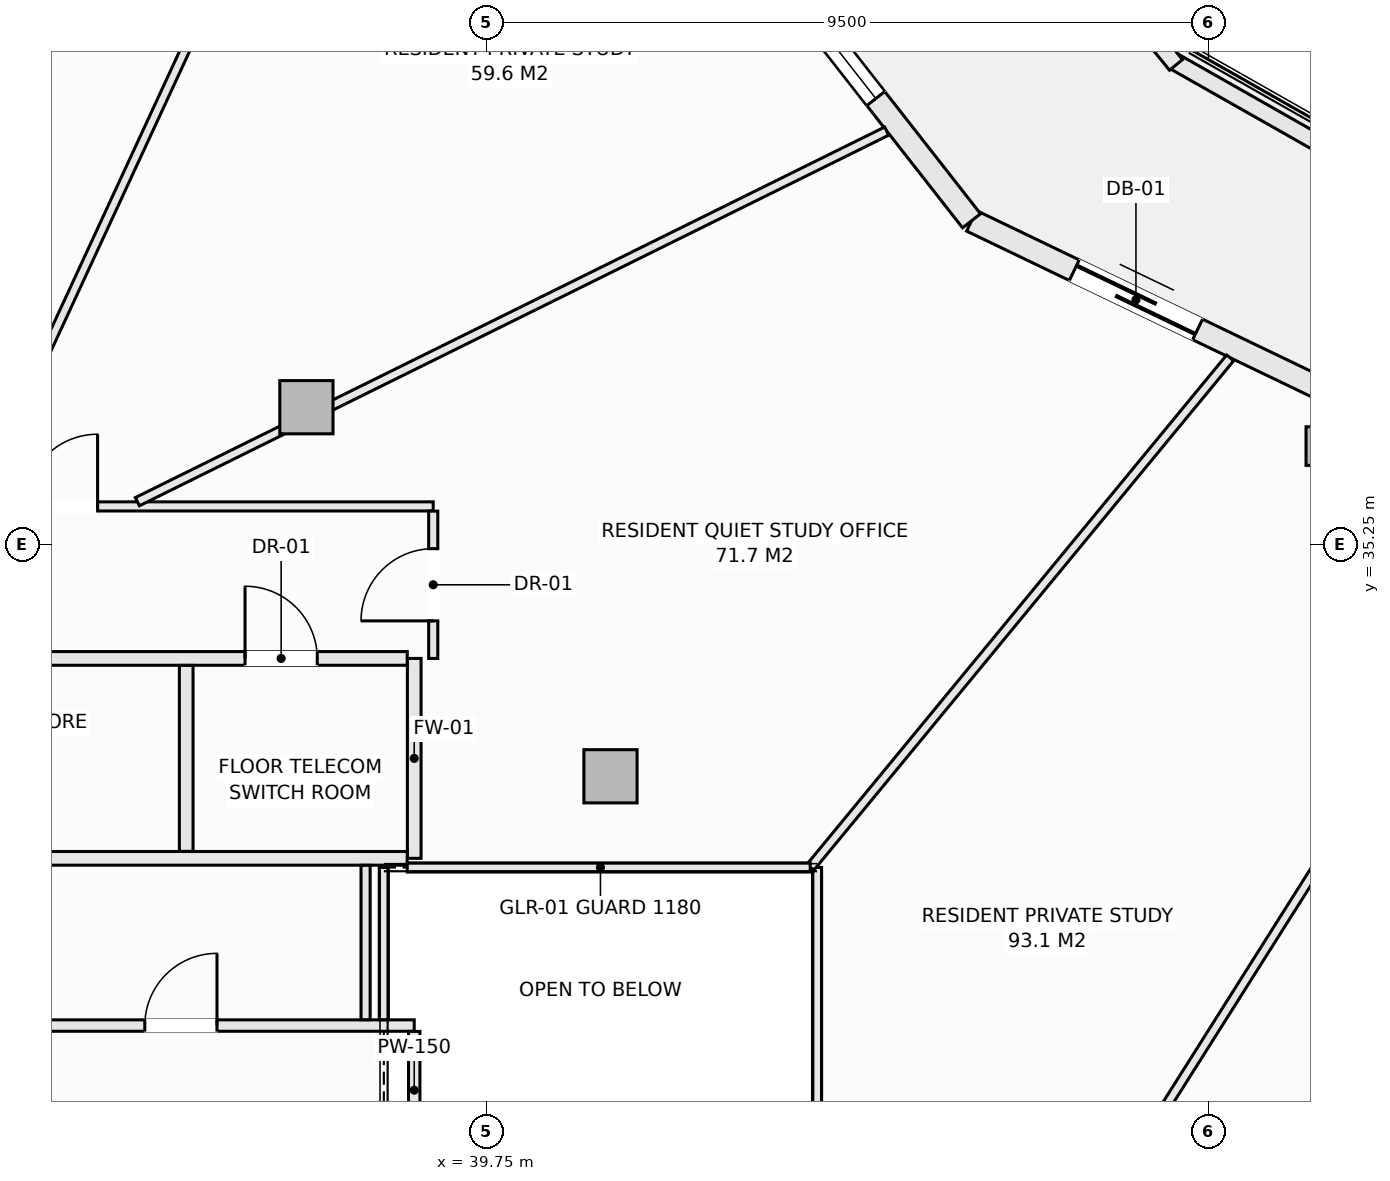
"""IFC4 building model, lengths in metres.
Left out: names, types, materials, properties, quantities, classifications, styles, units other than length and angle.
Written with IfcOpenShell. Run it as: python <this file> out.ifc"""

import sys

from ifc_helpers import new_model, si_unit, direction, frame, frame_2d, origin, origin_2d, place, context, subcontext, project, spatial, rectangle, hollow_rectangle, extrude, element, fill, save


model = new_model("IFC4")
c1 = context("Model", 3, precision=1e-05, world=origin(), true_north=direction((0.0, 1.0)))
c2 = subcontext(c1, "Body", "Model", "MODEL_VIEW")
j1 = project(units=[si_unit("LENGTHUNIT", "METRE"), si_unit("PLANEANGLEUNIT", "RADIAN")], contexts=[c1])
p1 = place(None, origin())
s1 = spatial("IfcSite", under=j1, at=p1, CompositionType="ELEMENT")
p2 = place(p1, origin())
s2 = spatial("IfcBuilding", under=s1, at=p2, CompositionType="ELEMENT")
p3 = place(p2, frame((0.0, 0.0, 206.3)))
s3 = spatial("IfcBuildingStorey", under=s2, at=p3, CompositionType="ELEMENT", Elevation=206.3)
p4 = place(p3, frame((50.787, 36.544, -0.27), z_axis=(0.0, 0.0, 1.0), x_axis=(1.0, 0.0, 0.0)))
e1 = element("IfcColumn", 1, at=p4, inside=s3, PredefinedType="COLUMN", context=c2, shape_type="SweptSolid", body=[
    extrude(hollow_rectangle(XDim=0.508, YDim=0.508, WallThickness=0.019, at=origin_2d()), origin(), (0.0, 0.0, 1.0), 3.3),
])
for number, where, z_axis, x_axis in (
    (2, (41.382, 32.199, -0.27), (0.0, 0.0, 1.0), (1.0, 0.0, 0.0)),
    (3, (37.382, 37.055, -0.27), (0.0, 0.0, 1.0), (1.0, 0.0, 0.0)),
):
    element("IfcColumn", number, at=place(p3, frame(where, z_axis=z_axis, x_axis=x_axis)), inside=s3, PredefinedType="COLUMN", context=c2, shape_type="SweptSolid", body=[
        extrude(rectangle(XDim=0.7, YDim=0.7, at=origin_2d()), origin(), (0.0, 0.0, 1.0), 3.3),
    ])
p5 = place(p3, frame((46.133, 39.507, 0.0), z_axis=(0.0, 0.0, 1.0), x_axis=(0.901348331142, -0.433094892545, 0.0)))
e4 = element("IfcWall", 4, at=p5, inside=s3, PredefinedType="SOLIDWALL", context=c2, shape_type="SweptSolid", body=[
    extrude(rectangle(XDim=6.021, YDim=0.3, at=frame_2d((3.01, 0.0))), origin(), (0.0, 0.0, 1.0), 2.605),
])
p6 = place(p5, frame((1.5, 0.0, 0.0)))
e5 = element("IfcOpeningElement", 5, at=p6, cuts=e4, PredefinedType="OPENING", context=c2, shape_type="SweptSolid", body=[
    extrude(rectangle(XDim=1.8, YDim=2.25, at=frame_2d((0.9, 1.125))), frame((0.0, 0.16, 0.0), z_axis=(0.0, -1.0, 0.0), x_axis=(1.0, 0.0, 0.0)), (0.0, 0.0, 1.0), 0.32),
])
p7 = place(p3, frame((42.5, 44.147, 0.0), z_axis=(0.0, 0.0, 1.0), x_axis=(0.616450126935, -0.787393955401, 0.0)))
e6 = element("IfcWall", 6, at=p7, inside=s3, PredefinedType="SOLIDWALL", context=c2, shape_type="SweptSolid", body=[
    extrude(rectangle(XDim=5.893, YDim=0.3, at=frame_2d((2.946, 0.0))), origin(), (0.0, 0.0, 1.0), 2.605),
])
p8 = place(p7, frame((1.65, 0.0, 0.72)))
e7 = element("IfcOpeningElement", 7, at=p8, cuts=e6, PredefinedType="OPENING", context=c2, shape_type="SweptSolid", body=[
    extrude(rectangle(XDim=2.2, YDim=1.65, at=frame_2d((1.1, 0.825))), frame((0.0, 0.16, 0.0), z_axis=(0.0, -1.0, 0.0), x_axis=(1.0, 0.0, 0.0)), (0.0, 0.0, 1.0), 0.32),
])
p9 = place(p3, frame((48.776, 41.617, 0.0), z_axis=(0.0, 0.0, 1.0), x_axis=(0.869860619267, -0.493297580623, 0.0)))
e8 = element("IfcWall", 8, at=p9, inside=s3, PredefinedType="PARAPET", context=c2, shape_type="SweptSolid", body=[
    extrude(rectangle(XDim=6.743, YDim=0.22, at=frame_2d((3.371, 0.0))), origin(), (0.0, 0.0, 1.0), 0.52),
])
p10 = place(p3, frame((44.448, 46.913, 0.0), z_axis=(0.0, 0.0, 1.0), x_axis=(0.632697312147, -0.774399193699, 0.0)))
e9 = element("IfcWall", 9, at=p10, inside=s3, PredefinedType="PARAPET", context=c2, shape_type="SweptSolid", body=[
    extrude(rectangle(XDim=6.914, YDim=0.22, at=frame_2d((3.457, 0.0))), origin(), (0.0, 0.0, 1.0), 0.52),
])
p11 = place(p3, frame((30.077, 28.92, 0.0), z_axis=(0.0, 0.0, 1.0), x_axis=(1.0, 0.0, 0.0)))
e10 = element("IfcWall", 10, at=p11, inside=s3, PredefinedType="PARTITIONING", context=c2, shape_type="SweptSolid", body=[
    extrude(rectangle(XDim=8.723, YDim=0.15, at=frame_2d((4.362, 0.0))), origin(), (0.0, 0.0, 1.0), 3.03),
])
p12 = place(p11, frame((1.342, 0.0, 0.0)))
e11 = element("IfcOpeningElement", 11, at=p12, cuts=e10, PredefinedType="OPENING", context=c2, shape_type="SweptSolid", body=[
    extrude(rectangle(XDim=0.95, YDim=2.1, at=frame_2d((0.475, 1.05))), frame((0.0, 0.085, 0.0), z_axis=(0.0, -1.0, 0.0), x_axis=(1.0, 0.0, 0.0)), (0.0, 0.0, 1.0), 0.17),
])
p13 = place(p11, frame((5.178, 0.0, 0.0)))
e12 = element("IfcOpeningElement", 12, at=p13, cuts=e10, PredefinedType="OPENING", context=c2, shape_type="SweptSolid", body=[
    extrude(rectangle(XDim=0.95, YDim=2.1, at=frame_2d((0.475, 1.05))), frame((0.0, 0.085, 0.0), z_axis=(0.0, -1.0, 0.0), x_axis=(1.0, 0.0, 0.0)), (0.0, 0.0, 1.0), 0.17),
])
p14 = place(p3, frame((38.8, 27.297, 0.0), z_axis=(0.0, 0.0, 1.0), x_axis=(0.0, 1.0, 0.0)))
e13 = element("IfcWall", 13, at=p14, inside=s3, PredefinedType="PARTITIONING", context=c2, shape_type="SweptSolid", body=[
    extrude(rectangle(XDim=1.546, YDim=0.15, at=frame_2d((0.773, 0.0))), origin(), (0.0, 0.0, 1.0), 3.03),
])
p15 = place(p3, frame((38.8, 31.12, 0.0), z_axis=(0.0, 0.0, 1.0), x_axis=(0.0, 1.0, 0.0)))
e14 = element("IfcWall", 14, at=p15, inside=s3, PredefinedType="SOLIDWALL", context=c2, shape_type="SweptSolid", body=[
    extrude(rectangle(XDim=2.63, YDim=0.18, at=frame_2d((1.315, 0.0))), origin(), (0.0, 0.0, 1.0), 3.03),
])
p16 = place(p3, frame((30.077, 31.12, 0.0), z_axis=(0.0, 0.0, 1.0), x_axis=(1.0, 0.0, 0.0)))
e15 = element("IfcWall", 15, at=p16, inside=s3, PredefinedType="SOLIDWALL", context=c2, shape_type="SweptSolid", body=[
    extrude(rectangle(XDim=8.631, YDim=0.18, at=frame_2d((4.315, 0.0))), origin(), (0.0, 0.0, 1.0), 3.03),
])
p17 = place(p16, frame((2.592, 0.0, 0.0)))
e16 = element("IfcOpeningElement", 16, at=p17, cuts=e15, PredefinedType="OPENING", context=c2, shape_type="SweptSolid", body=[
    extrude(rectangle(XDim=0.95, YDim=2.1, at=frame_2d((0.475, 1.05))), frame((0.0, 0.1, 0.0), z_axis=(0.0, -1.0, 0.0), x_axis=(1.0, 0.0, 0.0)), (0.0, 0.0, 1.0), 0.2),
])
p18 = place(p3, frame((30.077, 33.75, 0.0), z_axis=(0.0, 0.0, 1.0), x_axis=(1.0, 0.0, 0.0)))
e17 = element("IfcWall", 17, at=p18, inside=s3, PredefinedType="SOLIDWALL", context=c2, shape_type="SweptSolid", body=[
    extrude(rectangle(XDim=8.631, YDim=0.18, at=frame_2d((4.315, 0.0))), origin(), (0.0, 0.0, 1.0), 3.03),
])
p19 = place(p18, frame((6.497, 0.0, 0.0)))
e18 = element("IfcOpeningElement", 18, at=p19, cuts=e17, PredefinedType="OPENING", context=c2, shape_type="SweptSolid", body=[
    extrude(rectangle(XDim=0.95, YDim=2.1, at=frame_2d((0.475, 1.05))), frame((0.0, 0.1, 0.0), z_axis=(0.0, -1.0, 0.0), x_axis=(1.0, 0.0, 0.0)), (0.0, 0.0, 1.0), 0.2),
])
p20 = place(p3, frame((35.8, 31.212, 0.0), z_axis=(0.0, 0.0, 1.0), x_axis=(0.0, 1.0, 0.0)))
e19 = element("IfcWall", 19, at=p20, inside=s3, PredefinedType="SOLIDWALL", context=c2, shape_type="SweptSolid", body=[
    extrude(rectangle(XDim=2.446, YDim=0.18, at=frame_2d((1.223, 0.0))), origin(), (0.0, 0.0, 1.0), 3.03),
])
p21 = place(p3, frame((30.062, 35.75, 0.0), z_axis=(0.0, 0.0, 1.0), x_axis=(1.0, 0.0, 0.0)))
e20 = element("IfcWall", 20, at=p21, inside=s3, PredefinedType="PARTITIONING", context=c2, shape_type="SweptSolid", body=[
    extrude(rectangle(XDim=8.988, YDim=0.12, at=frame_2d((4.494, 0.0))), origin(), (0.0, 0.0, 1.0), 2.478),
])
p22 = place(p21, frame((3.622, 0.0, 0.0)))
e21 = element("IfcOpeningElement", 21, at=p22, cuts=e20, PredefinedType="OPENING", context=c2, shape_type="SweptSolid", body=[
    extrude(rectangle(XDim=0.95, YDim=2.1, at=frame_2d((0.475, 1.05))), frame((0.0, 0.07, 0.0), z_axis=(0.0, -1.0, 0.0), x_axis=(1.0, 0.0, 0.0)), (0.0, 0.0, 1.0), 0.14),
])
p23 = place(p21, frame((1.216, 0.0, 0.0)))
e22 = element("IfcOpeningElement", 22, at=p23, cuts=e20, PredefinedType="OPENING", context=c2, shape_type="SweptSolid", body=[
    extrude(rectangle(XDim=0.95, YDim=2.1, at=frame_2d((0.475, 1.05))), frame((0.0, 0.07, 0.0), z_axis=(0.0, -1.0, 0.0), x_axis=(1.0, 0.0, 0.0)), (0.0, 0.0, 1.0), 0.14),
])
p24 = place(p3, frame((39.05, 33.75, 0.0), z_axis=(0.0, 0.0, 1.0), x_axis=(0.0, 1.0, 0.0)))
e23 = element("IfcWall", 23, at=p24, inside=s3, PredefinedType="PARTITIONING", context=c2, shape_type="SweptSolid", body=[
    extrude(rectangle(XDim=1.938, YDim=0.12, at=frame_2d((0.969, 0.0))), origin(), (0.0, 0.0, 1.0), 3.03),
])
p25 = place(p24, frame((0.494, 0.0, 0.0)))
e24 = element("IfcOpeningElement", 24, at=p25, cuts=e23, PredefinedType="OPENING", context=c2, shape_type="SweptSolid", body=[
    extrude(rectangle(XDim=0.95, YDim=2.1, at=frame_2d((0.475, 1.05))), frame((0.0, 0.07, 0.0), z_axis=(0.0, -1.0, 0.0), x_axis=(1.0, 0.0, 0.0)), (0.0, 0.0, 1.0), 0.14),
])
p26 = place(p3, frame((38.16, 28.997, 0.0), z_axis=(0.0, 0.0, 1.0), x_axis=(0.0, 1.0, 0.0)))
e25 = element("IfcWall", 25, at=p26, inside=s3, PredefinedType="PARTITIONING", context=c2, shape_type="SweptSolid", body=[
    extrude(rectangle(XDim=2.031, YDim=0.12, at=frame_2d((1.016, 0.0))), origin(), (0.0, 0.0, 1.0), 3.03),
])
p27 = place(p3, frame((41.582, 16.617, 0.0), z_axis=(0.0, 0.0, 1.0), x_axis=(0.534374121444, 0.845248069108, 0.0)))
e26 = element("IfcWall", 26, at=p27, inside=s3, PredefinedType="PARTITIONING", context=c2, shape_type="SweptSolid", body=[
    extrude(rectangle(XDim=20.892, YDim=0.12, at=frame_2d((10.446, 0.0))), origin(), (0.0, 0.0, 1.0), 3.03),
])
p28 = place(p3, frame((44.1, 27.812, 0.0), z_axis=(0.0, 0.0, 1.0), x_axis=(0.0, 1.0, 0.0)))
e27 = element("IfcWall", 27, at=p28, inside=s3, PredefinedType="PARTITIONING", context=c2, shape_type="SweptSolid", body=[
    extrude(rectangle(XDim=3.188, YDim=0.12, at=frame_2d((1.594, 0.0))), origin(), (0.0, 0.0, 1.0), 3.03),
])
p29 = place(p3, frame((44.01, 31.0, 0.0), z_axis=(0.0, 0.0, 1.0), x_axis=(0.635986973411, 0.771699792439, 0.0)))
e28 = element("IfcWall", 28, at=p29, inside=s3, PredefinedType="PARTITIONING", context=c2, shape_type="SweptSolid", body=[
    extrude(rectangle(XDim=8.687, YDim=0.12, at=frame_2d((4.344, 0.0))), origin(), (0.0, 0.0, 1.0), 2.712),
])
p30 = place(p3, frame((38.708, 31.0, 0.0), z_axis=(0.0, 0.0, 1.0), x_axis=(1.0, 0.0, 0.0)))
e29 = element("IfcWall", 29, at=p30, inside=s3, PredefinedType="PARTITIONING", context=c2, shape_type="SweptSolid", body=[
    extrude(rectangle(XDim=5.302, YDim=0.12, at=frame_2d((2.651, 0.0))), origin(), (0.0, 0.0, 1.0), 3.03),
])
p31 = place(p3, frame((38.4, 28.997, 0.0), z_axis=(0.0, 0.0, 1.0), x_axis=(0.0, 1.0, 0.0)))
e30 = element("IfcWall", 30, at=p31, inside=s3, PredefinedType="PARTITIONING", context=c2, shape_type="SweptSolid", body=[
    extrude(rectangle(XDim=2.003, YDim=0.12, at=frame_2d((1.001, 0.0))), origin(), (0.0, 0.0, 1.0), 3.03),
])
p32 = place(p3, frame((35.157, 35.812, 0.0), z_axis=(0.0, 0.0, 1.0), x_axis=(0.896376577458, 0.443293391992, 0.0)))
e31 = element("IfcWall", 31, at=p32, inside=s3, PredefinedType="PARTITIONING", context=c2, shape_type="SweptSolid", body=[
    extrude(rectangle(XDim=10.998, YDim=0.12, at=frame_2d((5.499, 0.0))), origin(), (0.0, 0.0, 1.0), 2.478),
])
p33 = place(p3, frame((33.038, 35.812, 0.0), z_axis=(0.0, 0.0, 1.0), x_axis=(0.419785881818, 0.907623167083, 0.0)))
e32 = element("IfcWall", 32, at=p33, inside=s3, PredefinedType="PARTITIONING", context=c2, shape_type="SweptSolid", body=[
    extrude(rectangle(XDim=10.806, YDim=0.12, at=frame_2d((5.403, 0.0))), origin(), (0.0, 0.0, 1.0), 3.03),
])
p34 = place(p6, origin())
e33 = element("IfcDoor", 33, at=p34, inside=s3, OperationType="SLIDING_TO_LEFT", PredefinedType="DOOR", context=c2, shape_type="SweptSolid", body=[
    extrude(rectangle(XDim=1.8, YDim=2.25, at=frame_2d((0.9, 1.125))), frame((0.0, 0.025, 0.0), z_axis=(0.0, -1.0, 0.0), x_axis=(1.0, 0.0, 0.0)), (0.0, 0.0, 1.0), 0.05),
])
fill(e5, e33)
p35 = place(p8, origin())
e34 = element("IfcWindow", 34, at=p35, inside=s3, PartitioningType="SINGLE_PANEL", PredefinedType="WINDOW", context=c2, shape_type="SweptSolid", body=[
    extrude(rectangle(XDim=2.2, YDim=1.65, at=frame_2d((1.1, 0.825))), frame((0.0, 0.03, 0.0), z_axis=(0.0, -1.0, 0.0), x_axis=(1.0, 0.0, 0.0)), (0.0, 0.0, 1.0), 0.06),
])
fill(e7, e34)
p36 = place(p13, origin())
e35 = element("IfcDoor", 35, at=p36, inside=s3, OperationType="SINGLE_SWING_RIGHT", PredefinedType="DOOR", context=c2, shape_type="SweptSolid", body=[
    extrude(rectangle(XDim=0.95, YDim=2.1, at=frame_2d((0.475, 1.05))), frame((0.0, 0.025, 0.0), z_axis=(0.0, -1.0, 0.0), x_axis=(1.0, 0.0, 0.0)), (0.0, 0.0, 1.0), 0.05),
])
fill(e12, e35)
p37 = place(p19, origin())
e36 = element("IfcDoor", 36, at=p37, inside=s3, OperationType="SINGLE_SWING_LEFT", PredefinedType="DOOR", context=c2, shape_type="SweptSolid", body=[
    extrude(rectangle(XDim=0.95, YDim=2.1, at=frame_2d((0.475, 1.05))), frame((0.0, 0.025, 0.0), z_axis=(0.0, -1.0, 0.0), x_axis=(1.0, 0.0, 0.0)), (0.0, 0.0, 1.0), 0.05),
])
fill(e18, e36)
p38 = place(p25, origin())
e37 = element("IfcDoor", 37, at=p38, inside=s3, OperationType="SINGLE_SWING_LEFT", PredefinedType="DOOR", context=c2, shape_type="SweptSolid", body=[
    extrude(rectangle(XDim=0.95, YDim=2.1, at=frame_2d((0.475, 1.05))), frame((0.0, 0.025, 0.0), z_axis=(0.0, -1.0, 0.0), x_axis=(1.0, 0.0, 0.0)), (0.0, 0.0, 1.0), 0.05),
])
fill(e24, e37)
p39 = place(p22, origin())
e38 = element("IfcDoor", 38, at=p39, inside=s3, OperationType="SINGLE_SWING_RIGHT", PredefinedType="DOOR", context=c2, shape_type="SweptSolid", body=[
    extrude(rectangle(XDim=0.95, YDim=2.1, at=frame_2d((0.475, 1.05))), frame((0.0, 0.025, 0.0), z_axis=(0.0, -1.0, 0.0), x_axis=(1.0, 0.0, 0.0)), (0.0, 0.0, 1.0), 0.05),
])
fill(e21, e38)
save(model, sys.argv[1])
